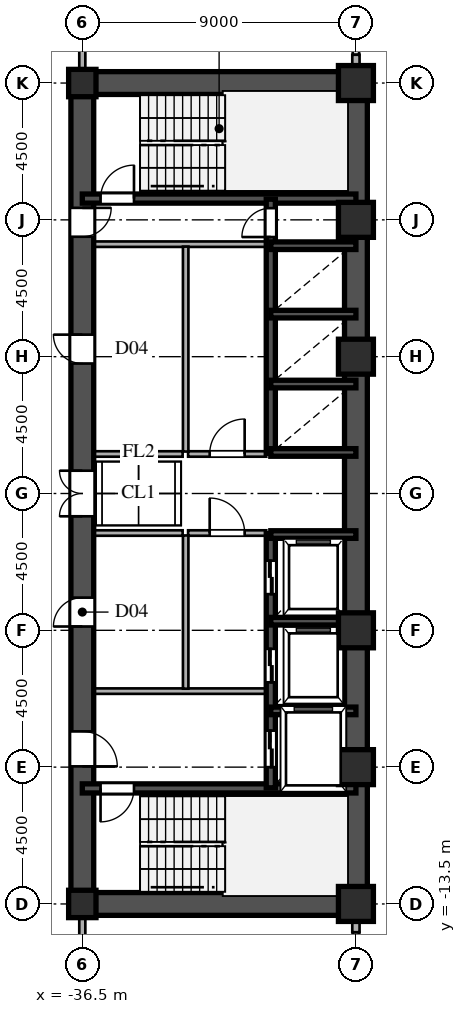
"""IFC4 building model, lengths in metres.
Left out: names, types, materials, properties, quantities, classifications, styles, units other than length and angle.
Written with IfcOpenShell. Run it as: python <this file> out.ifc"""

import sys

from ifc_helpers import new_model, si_unit, direction, frame, frame_2d, origin, origin_2d, place, context, subcontext, project, spatial, rectangle, hollow_rectangle, i_section, extrude, source, transform, mapped, element, fill, save


model = new_model("IFC4")
c1 = context("Model", 3, precision=1e-05, world=origin(), true_north=direction((0.0, 1.0)))
c2 = subcontext(c1, "Body", "Model", "MODEL_VIEW")
j1 = project(units=[si_unit("LENGTHUNIT", "METRE"), si_unit("PLANEANGLEUNIT", "RADIAN")], contexts=[c1])
p1 = place(None, origin())
s1 = spatial("IfcSite", under=j1, at=p1, CompositionType="ELEMENT")
p2 = place(p1, origin())
s2 = spatial("IfcBuilding", under=s1, at=p2, CompositionType="ELEMENT")
p3 = place(p2, frame((0.0, 0.0, 44.1)))
s3 = spatial("IfcBuildingStorey", under=s2, at=p3, CompositionType="ELEMENT", Elevation=44.1)
m1 = source(origin(), c2, "Body", "SweptSolid", [
    extrude(hollow_rectangle(XDim=1.15, YDim=1.15, WallThickness=0.048, at=origin_2d()), origin(), (0.0, 0.0, 1.0), 3.6),
])
for number, where, z_axis, x_axis in (
    (1, (-27.5, -13.5, 0.0), (0.0, 0.0, 1.0), (1.0, 0.0, 0.0)),
    (2, (-27.5, -9.0, 0.0), (0.0, 0.0, 1.0), (1.0, 0.0, 0.0)),
    (3, (-27.5, -4.5, 0.0), (0.0, 0.0, 1.0), (1.0, 0.0, 0.0)),
    (4, (-27.5, 4.5, 0.0), (0.0, 0.0, 1.0), (1.0, 0.0, 0.0)),
    (5, (-27.5, 9.0, 0.0), (0.0, 0.0, 1.0), (1.0, 0.0, 0.0)),
    (6, (-27.5, 13.5, 0.0), (0.0, 0.0, 1.0), (1.0, 0.0, 0.0)),
):
    element("IfcColumn", number, at=place(p3, frame(where, z_axis=z_axis, x_axis=x_axis)), inside=s3, PredefinedType="COLUMN", context=c2, shape_type="MappedRepresentation", body=[
        mapped(m1, transform((0.0, 0.0, 0.0), scale=1.0)),
    ])
m2 = source(origin(), c2, "Body", "SweptSolid", [
    extrude(i_section(OverallWidth=0.9, OverallDepth=0.9, WebThickness=0.036, FlangeThickness=0.055, at=origin_2d()), origin(), (0.0, 0.0, 1.0), 3.6),
])
for number, where, z_axis, x_axis in (
    (7, (-36.5, -13.5, 0.0), (0.0, 0.0, 1.0), (1.0, 0.0, 0.0)),
    (8, (-36.5, 13.5, 0.0), (0.0, 0.0, 1.0), (1.0, 0.0, 0.0)),
):
    element("IfcColumn", number, at=place(p3, frame(where, z_axis=z_axis, x_axis=x_axis)), inside=s3, PredefinedType="COLUMN", context=c2, shape_type="MappedRepresentation", body=[
        mapped(m2, transform((0.0, 0.0, 0.0), scale=1.0)),
    ])
for number, where, z_axis, x_axis in (
    (9, (-27.5, -14.43, 0.0), (0.0, 0.0, 1.0), (0.0, 1.0, 0.0)),
    (10, (-27.5, 13.88, 0.0), (0.0, 0.0, 1.0), (0.0, 1.0, 0.0)),
):
    element("IfcWall", number, at=place(p3, frame(where, z_axis=z_axis, x_axis=x_axis)), inside=s3, PredefinedType="SOLIDWALL", context=c2, shape_type="SweptSolid", body=[
        extrude(rectangle(XDim=0.55, YDim=0.24, at=frame_2d((0.275, 0.0))), origin(), (0.0, 0.0, 1.0), 2.88),
    ])
for number, where, z_axis, x_axis in (
    (11, (-27.5, -13.5, 0.0), (0.0, 0.0, 1.0), (0.0, 1.0, 0.0)),
    (12, (-27.5, 1.3, 0.0), (0.0, 0.0, 1.0), (0.0, 1.0, 0.0)),
):
    element("IfcWall", number, at=place(p3, frame(where, z_axis=z_axis, x_axis=x_axis)), inside=s3, PredefinedType="SHEAR", context=c2, shape_type="SweptSolid", body=[
        extrude(rectangle(XDim=12.2, YDim=0.75, at=frame_2d((6.1, 0.0))), origin(), (0.0, 0.0, 1.0), 3.38),
    ])
p4 = place(p3, frame((-27.5, -1.3, 0.0), z_axis=(0.0, 0.0, 1.0), x_axis=(0.0, 1.0, 0.0)))
e13 = element("IfcWall", 13, at=p4, inside=s3, PredefinedType="SHEAR", context=c2, shape_type="SweptSolid", body=[
    extrude(rectangle(XDim=2.6, YDim=0.75, at=frame_2d((1.3, 0.0))), origin(), (0.0, 0.0, 1.0), 3.38),
])
for number, where, z_axis, x_axis in (
    (14, (-36.5, -13.5, 0.0), (0.0, 0.0, 1.0), (1.0, 0.0, 0.0)),
    (15, (-36.5, 13.5, 0.0), (0.0, 0.0, 1.0), (1.0, 0.0, 0.0)),
):
    element("IfcWall", number, at=place(p3, frame(where, z_axis=z_axis, x_axis=x_axis)), inside=s3, PredefinedType="SHEAR", context=c2, shape_type="SweptSolid", body=[
        extrude(rectangle(XDim=9.0, YDim=0.75, at=frame_2d((4.5, 0.0))), origin(), (0.0, 0.0, 1.0), 3.38),
    ])
p5 = place(p3, frame((-36.5, -13.65, 0.0), z_axis=(0.0, 0.0, 1.0), x_axis=(0.0, 1.0, 0.0)))
e16 = element("IfcWall", 16, at=p5, inside=s3, PredefinedType="SHEAR", context=c2, shape_type="SweptSolid", body=[
    extrude(rectangle(XDim=7.15, YDim=0.75, at=frame_2d((3.575, 0.0))), origin(), (0.0, 0.0, 1.0), 3.38),
])
p6 = place(p5, frame((4.675, 0.0, 0.0)))
e17 = element("IfcOpeningElement", 17, at=p6, cuts=e16, PredefinedType="OPENING", context=c2, shape_type="SweptSolid", body=[
    extrude(rectangle(XDim=1.15, YDim=2.2, at=frame_2d((0.575, 1.1))), frame((0.0, 0.385, 0.0), z_axis=(0.0, -1.0, 0.0), x_axis=(1.0, 0.0, 0.0)), (0.0, 0.0, 1.0), 0.77),
])
p7 = place(p3, frame((-36.5, -1.3, 0.0), z_axis=(0.0, 0.0, 1.0), x_axis=(0.0, 1.0, 0.0)))
e18 = element("IfcWall", 18, at=p7, inside=s3, PredefinedType="SHEAR", context=c2, shape_type="SweptSolid", body=[
    extrude(rectangle(XDim=2.6, YDim=0.75, at=frame_2d((1.3, 0.0))), origin(), (0.0, 0.0, 1.0), 3.38),
])
p8 = place(p7, frame((0.55, 0.0, 0.0)))
e19 = element("IfcOpeningElement", 19, at=p8, cuts=e18, PredefinedType="OPENING", context=c2, shape_type="SweptSolid", body=[
    extrude(rectangle(XDim=1.5, YDim=2.3, at=frame_2d((0.75, 1.15))), frame((0.0, 0.385, 0.0), z_axis=(0.0, -1.0, 0.0), x_axis=(1.0, 0.0, 0.0)), (0.0, 0.0, 1.0), 0.77),
])
p9 = place(p3, frame((-36.5, 8.2, 0.0), z_axis=(0.0, 0.0, 1.0), x_axis=(0.0, 1.0, 0.0)))
e20 = element("IfcWall", 20, at=p9, inside=s3, PredefinedType="SHEAR", context=c2, shape_type="SweptSolid", body=[
    extrude(rectangle(XDim=5.45, YDim=0.75, at=frame_2d((2.725, 0.0))), origin(), (0.0, 0.0, 1.0), 3.38),
])
p10 = place(p9, frame((0.245, 0.0, 0.0)))
e21 = element("IfcOpeningElement", 21, at=p10, cuts=e20, PredefinedType="OPENING", context=c2, shape_type="SweptSolid", body=[
    extrude(rectangle(XDim=0.95, YDim=2.15, at=frame_2d((0.475, 1.075))), frame((0.0, 0.385, 0.0), z_axis=(0.0, -1.0, 0.0), x_axis=(1.0, 0.0, 0.0)), (0.0, 0.0, 1.0), 0.77),
])
p11 = place(p3, frame((-36.5, -6.5, 0.0), z_axis=(0.0, 0.0, 1.0), x_axis=(0.0, 1.0, 0.0)))
e22 = element("IfcWall", 22, at=p11, inside=s3, PredefinedType="SHEAR", context=c2, shape_type="SweptSolid", body=[
    extrude(rectangle(XDim=5.2, YDim=0.75, at=frame_2d((2.6, 0.0))), origin(), (0.0, 0.0, 1.0), 3.38),
])
p12 = place(p11, frame((2.125, 0.0, 0.0)))
e23 = element("IfcOpeningElement", 23, at=p12, cuts=e22, PredefinedType="OPENING", context=c2, shape_type="SweptSolid", body=[
    extrude(rectangle(XDim=0.95, YDim=2.15, at=frame_2d((0.475, 1.075))), frame((0.0, 0.385, 0.0), z_axis=(0.0, -1.0, 0.0), x_axis=(1.0, 0.0, 0.0)), (0.0, 0.0, 1.0), 0.77),
])
p13 = place(p3, frame((-36.5, 1.3, 0.0), z_axis=(0.0, 0.0, 1.0), x_axis=(0.0, 1.0, 0.0)))
e24 = element("IfcWall", 24, at=p13, inside=s3, PredefinedType="SHEAR", context=c2, shape_type="SweptSolid", body=[
    extrude(rectangle(XDim=6.9, YDim=0.75, at=frame_2d((3.45, 0.0))), origin(), (0.0, 0.0, 1.0), 3.38),
])
p14 = place(p13, frame((2.975, 0.0, 0.0)))
e25 = element("IfcOpeningElement", 25, at=p14, cuts=e24, PredefinedType="OPENING", context=c2, shape_type="SweptSolid", body=[
    extrude(rectangle(XDim=0.95, YDim=2.15, at=frame_2d((0.475, 1.075))), frame((0.0, 0.385, 0.0), z_axis=(0.0, -1.0, 0.0), x_axis=(1.0, 0.0, 0.0)), (0.0, 0.0, 1.0), 0.77),
])
p15 = place(p3, frame((-36.5, -9.7, 0.0), z_axis=(0.0, 0.0, 1.0), x_axis=(1.0, 0.0, 0.0)))
e26 = element("IfcWall", 26, at=p15, inside=s3, PredefinedType="SHEAR", context=c2, shape_type="SweptSolid", body=[
    extrude(rectangle(XDim=9.0, YDim=0.3, at=frame_2d((4.5, 0.0))), origin(), (0.0, 0.0, 1.0), 3.38),
])
p16 = place(p15, frame((0.6, 0.0, 0.0)))
e27 = element("IfcOpeningElement", 27, at=p16, cuts=e26, PredefinedType="OPENING", context=c2, shape_type="SweptSolid", body=[
    extrude(rectangle(XDim=1.1, YDim=2.2, at=frame_2d((0.55, 1.1))), frame((0.0, 0.16, 0.0), z_axis=(0.0, -1.0, 0.0), x_axis=(1.0, 0.0, 0.0)), (0.0, 0.0, 1.0), 0.32),
])
p17 = place(p3, frame((-36.5, 9.7, 0.0), z_axis=(0.0, 0.0, 1.0), x_axis=(1.0, 0.0, 0.0)))
e28 = element("IfcWall", 28, at=p17, inside=s3, PredefinedType="SHEAR", context=c2, shape_type="SweptSolid", body=[
    extrude(rectangle(XDim=9.0, YDim=0.3, at=frame_2d((4.5, 0.0))), origin(), (0.0, 0.0, 1.0), 3.38),
])
p18 = place(p17, frame((0.6, 0.0, 0.0)))
e29 = element("IfcOpeningElement", 29, at=p18, cuts=e28, PredefinedType="OPENING", context=c2, shape_type="SweptSolid", body=[
    extrude(rectangle(XDim=1.1, YDim=2.2, at=frame_2d((0.55, 1.1))), frame((0.0, 0.16, 0.0), z_axis=(0.0, -1.0, 0.0), x_axis=(1.0, 0.0, 0.0)), (0.0, 0.0, 1.0), 0.32),
])
for number, where, z_axis, x_axis in (
    (30, (-30.3, -7.15, 0.0), (0.0, 0.0, 1.0), (1.0, 0.0, 0.0)),
    (31, (-30.3, -4.2, 0.0), (0.0, 0.0, 1.0), (1.0, 0.0, 0.0)),
    (32, (-30.3, -1.35, 0.0), (0.0, 0.0, 1.0), (1.0, 0.0, 0.0)),
    (33, (-30.3, 1.35, 0.0), (0.0, 0.0, 1.0), (1.0, 0.0, 0.0)),
    (34, (-30.3, 3.6, 0.0), (0.0, 0.0, 1.0), (1.0, 0.0, 0.0)),
    (35, (-30.3, 5.9, 0.0), (0.0, 0.0, 1.0), (1.0, 0.0, 0.0)),
    (36, (-30.3, 8.15, 0.0), (0.0, 0.0, 1.0), (1.0, 0.0, 0.0)),
):
    element("IfcWall", number, at=place(p3, frame(where, z_axis=z_axis, x_axis=x_axis)), inside=s3, PredefinedType="SHEAR", context=c2, shape_type="SweptSolid", body=[
        extrude(rectangle(XDim=2.8, YDim=0.25, at=frame_2d((1.4, 0.0))), origin(), (0.0, 0.0, 1.0), 3.38),
    ])
p19 = place(p3, frame((-30.3, -9.68, 0.0), z_axis=(0.0, 0.0, 1.0), x_axis=(0.0, 1.0, 0.0)))
e37 = element("IfcWall", 37, at=p19, inside=s3, PredefinedType="SHEAR", context=c2, shape_type="SweptSolid", body=[
    extrude(rectangle(XDim=2.56, YDim=0.3, at=frame_2d((1.28, 0.0))), origin(), (0.0, 0.0, 1.0), 3.38),
])
p20 = place(p19, frame((0.68, 0.0, 0.0)))
e38 = element("IfcOpeningElement", 38, at=p20, cuts=e37, PredefinedType="OPENING", context=c2, shape_type="SweptSolid", body=[
    extrude(rectangle(XDim=1.2, YDim=2.25, at=frame_2d((0.6, 1.125))), frame((0.0, 0.16, 0.0), z_axis=(0.0, -1.0, 0.0), x_axis=(1.0, 0.0, 0.0)), (0.0, 0.0, 1.0), 0.32),
])
p21 = place(p3, frame((-30.3, -7.12, 0.0), z_axis=(0.0, 0.0, 1.0), x_axis=(0.0, 1.0, 0.0)))
e39 = element("IfcWall", 39, at=p21, inside=s3, PredefinedType="SHEAR", context=c2, shape_type="SweptSolid", body=[
    extrude(rectangle(XDim=2.92, YDim=0.3, at=frame_2d((1.46, 0.0))), origin(), (0.0, 0.0, 1.0), 3.38),
])
p22 = place(p21, frame((0.91, 0.0, 0.0)))
e40 = element("IfcOpeningElement", 40, at=p22, cuts=e39, PredefinedType="OPENING", context=c2, shape_type="SweptSolid", body=[
    extrude(rectangle(XDim=1.1, YDim=2.2, at=frame_2d((0.55, 1.1))), frame((0.0, 0.16, 0.0), z_axis=(0.0, -1.0, 0.0), x_axis=(1.0, 0.0, 0.0)), (0.0, 0.0, 1.0), 0.32),
])
p23 = place(p3, frame((-30.3, -4.2, 0.0), z_axis=(0.0, 0.0, 1.0), x_axis=(0.0, 1.0, 0.0)))
e41 = element("IfcWall", 41, at=p23, inside=s3, PredefinedType="SHEAR", context=c2, shape_type="SweptSolid", body=[
    extrude(rectangle(XDim=2.88, YDim=0.3, at=frame_2d((1.44, 0.0))), origin(), (0.0, 0.0, 1.0), 3.38),
])
p24 = place(p23, frame((0.89, 0.0, 0.0)))
e42 = element("IfcOpeningElement", 42, at=p24, cuts=e41, PredefinedType="OPENING", context=c2, shape_type="SweptSolid", body=[
    extrude(rectangle(XDim=1.1, YDim=2.2, at=frame_2d((0.55, 1.1))), frame((0.0, 0.16, 0.0), z_axis=(0.0, -1.0, 0.0), x_axis=(1.0, 0.0, 0.0)), (0.0, 0.0, 1.0), 0.32),
])
p25 = place(p3, frame((-30.3, 1.32, 0.0), z_axis=(0.0, 0.0, 1.0), x_axis=(0.0, 1.0, 0.0)))
e43 = element("IfcWall", 43, at=p25, inside=s3, PredefinedType="SHEAR", context=c2, shape_type="SweptSolid", body=[
    extrude(rectangle(XDim=2.28, YDim=0.3, at=frame_2d((1.14, 0.0))), origin(), (0.0, 0.0, 1.0), 3.38),
])
p26 = place(p3, frame((-30.3, 3.6, 0.0), z_axis=(0.0, 0.0, 1.0), x_axis=(0.0, 1.0, 0.0)))
e44 = element("IfcWall", 44, at=p26, inside=s3, PredefinedType="SHEAR", context=c2, shape_type="SweptSolid", body=[
    extrude(rectangle(XDim=2.3, YDim=0.3, at=frame_2d((1.15, 0.0))), origin(), (0.0, 0.0, 1.0), 3.38),
])
p27 = place(p3, frame((-30.3, 5.9, 0.0), z_axis=(0.0, 0.0, 1.0), x_axis=(0.0, 1.0, 0.0)))
e45 = element("IfcWall", 45, at=p27, inside=s3, PredefinedType="SHEAR", context=c2, shape_type="SweptSolid", body=[
    extrude(rectangle(XDim=2.25, YDim=0.3, at=frame_2d((1.125, 0.0))), origin(), (0.0, 0.0, 1.0), 3.38),
])
p28 = place(p3, frame((-30.3, 8.15, 0.0), z_axis=(0.0, 0.0, 1.0), x_axis=(0.0, 1.0, 0.0)))
e46 = element("IfcWall", 46, at=p28, inside=s3, PredefinedType="SHEAR", context=c2, shape_type="SweptSolid", body=[
    extrude(rectangle(XDim=1.53, YDim=0.3, at=frame_2d((0.765, 0.0))), origin(), (0.0, 0.0, 1.0), 3.38),
])
p29 = place(p28, frame((0.285, 0.0, 0.0)))
e47 = element("IfcOpeningElement", 47, at=p29, cuts=e46, PredefinedType="OPENING", context=c2, shape_type="SweptSolid", body=[
    extrude(rectangle(XDim=0.95, YDim=2.15, at=frame_2d((0.475, 1.075))), frame((0.0, 0.16, 0.0), z_axis=(0.0, -1.0, 0.0), x_axis=(1.0, 0.0, 0.0)), (0.0, 0.0, 1.0), 0.32),
])
for number, where, z_axis, x_axis in (
    (48, (-36.15, -6.5, 0.0), (0.0, 0.0, 1.0), (1.0, 0.0, 0.0)),
    (49, (-36.15, 8.2, 0.0), (0.0, 0.0, 1.0), (1.0, 0.0, 0.0)),
):
    element("IfcWall", number, at=place(p3, frame(where, z_axis=z_axis, x_axis=x_axis)), inside=s3, PredefinedType="PARTITIONING", context=c2, shape_type="SweptSolid", body=[
        extrude(rectangle(XDim=5.7, YDim=0.18, at=frame_2d((2.85, 0.0))), origin(), (0.0, 0.0, 1.0), 3.38),
    ])
p30 = place(p3, frame((-33.1, -6.42, 0.0), z_axis=(0.0, 0.0, 1.0), x_axis=(0.0, 1.0, 0.0)))
e50 = element("IfcWall", 50, at=p30, inside=s3, PredefinedType="PARTITIONING", context=c2, shape_type="SweptSolid", body=[
    extrude(rectangle(XDim=5.04, YDim=0.18, at=frame_2d((2.52, 0.0))), origin(), (0.0, 0.0, 1.0), 3.38),
])
p31 = place(p3, frame((-33.1, 1.38, 0.0), z_axis=(0.0, 0.0, 1.0), x_axis=(0.0, 1.0, 0.0)))
e51 = element("IfcWall", 51, at=p31, inside=s3, PredefinedType="PARTITIONING", context=c2, shape_type="SweptSolid", body=[
    extrude(rectangle(XDim=6.74, YDim=0.18, at=frame_2d((3.37, 0.0))), origin(), (0.0, 0.0, 1.0), 3.38),
])
p32 = place(p3, frame((-33.02, -1.3, 0.0), z_axis=(0.0, 0.0, 1.0), x_axis=(1.0, 0.0, 0.0)))
e52 = element("IfcWall", 52, at=p32, inside=s3, PredefinedType="PARTITIONING", context=c2, shape_type="SweptSolid", body=[
    extrude(rectangle(XDim=2.57, YDim=0.18, at=frame_2d((1.285, 0.0))), origin(), (0.0, 0.0, 1.0), 3.38),
])
p33 = place(p32, frame((0.71, 0.0, 0.0)))
e53 = element("IfcOpeningElement", 53, at=p33, cuts=e52, PredefinedType="OPENING", context=c2, shape_type="SweptSolid", body=[
    extrude(rectangle(XDim=1.15, YDim=2.2, at=frame_2d((0.575, 1.1))), frame((0.0, 0.1, 0.0), z_axis=(0.0, -1.0, 0.0), x_axis=(1.0, 0.0, 0.0)), (0.0, 0.0, 1.0), 0.2),
])
p34 = place(p3, frame((-33.02, 1.3, 0.0), z_axis=(0.0, 0.0, 1.0), x_axis=(1.0, 0.0, 0.0)))
e54 = element("IfcWall", 54, at=p34, inside=s3, PredefinedType="PARTITIONING", context=c2, shape_type="SweptSolid", body=[
    extrude(rectangle(XDim=2.57, YDim=0.18, at=frame_2d((1.285, 0.0))), origin(), (0.0, 0.0, 1.0), 3.38),
])
p35 = place(p34, frame((0.71, 0.0, 0.0)))
e55 = element("IfcOpeningElement", 55, at=p35, cuts=e54, PredefinedType="OPENING", context=c2, shape_type="SweptSolid", body=[
    extrude(rectangle(XDim=1.15, YDim=2.2, at=frame_2d((0.575, 1.1))), frame((0.0, 0.1, 0.0), z_axis=(0.0, -1.0, 0.0), x_axis=(1.0, 0.0, 0.0)), (0.0, 0.0, 1.0), 0.2),
])
for number, where, z_axis, x_axis in (
    (56, (-36.15, -1.3, 0.0), (0.0, 0.0, 1.0), (1.0, 0.0, 0.0)),
    (57, (-36.15, 1.3, 0.0), (0.0, 0.0, 1.0), (1.0, 0.0, 0.0)),
):
    element("IfcWall", number, at=place(p3, frame(where, z_axis=z_axis, x_axis=x_axis)), inside=s3, PredefinedType="PARTITIONING", context=c2, shape_type="SweptSolid", body=[
        extrude(rectangle(XDim=2.95, YDim=0.18, at=frame_2d((1.475, 0.0))), origin(), (0.0, 0.0, 1.0), 3.38),
    ])
for number, where, z_axis, x_axis in (
    (58, (-36.5, -15.515, 0.0), (0.0, 0.0, 1.0), (0.0, 1.0, 0.0)),
    (59, (-36.5, 13.88, 0.0), (0.0, 0.0, 1.0), (0.0, 1.0, 0.0)),
):
    element("IfcWall", number, at=place(p3, frame(where, z_axis=z_axis, x_axis=x_axis)), inside=s3, PredefinedType="PARTITIONING", context=c2, shape_type="SweptSolid", body=[
        extrude(rectangle(XDim=1.635, YDim=0.2, at=frame_2d((0.817, 0.0))), origin(), (0.0, 0.0, 1.0), 2.68),
    ])
m3 = source(origin(), c2, "Body", "SweptSolid", [
    extrude(rectangle(XDim=1.15, YDim=2.2, at=frame_2d((0.575, 1.1))), frame((0.0, 0.025, 0.0), z_axis=(0.0, -1.0, 0.0), x_axis=(1.0, 0.0, 0.0)), (0.0, 0.0, 1.0), 0.05),
])
p36 = place(p6, frame((1.15, 0.0, 0.0), z_axis=(0.0, 0.0, 1.0), x_axis=(-1.0, 0.0, 0.0)))
e60 = element("IfcDoor", 60, at=p36, inside=s3, OperationType="SINGLE_SWING_LEFT", PredefinedType="DOOR", context=c2, shape_type="MappedRepresentation", body=[
    mapped(m3, transform((0.0, 0.0, 0.0), scale=1.0)),
])
fill(e17, e60)
m4 = source(origin(), c2, "Body", "SweptSolid", [
    extrude(rectangle(XDim=1.5, YDim=2.3, at=frame_2d((0.75, 1.15))), frame((0.0, 0.025, 0.0), z_axis=(0.0, -1.0, 0.0), x_axis=(1.0, 0.0, 0.0)), (0.0, 0.0, 1.0), 0.05),
])
p37 = place(p8, origin())
e61 = element("IfcDoor", 61, at=p37, inside=s3, OperationType="DOUBLE_SWING_LEFT", PredefinedType="DOOR", context=c2, shape_type="MappedRepresentation", body=[
    mapped(m4, transform((0.0, 0.0, 0.0), scale=1.0)),
])
fill(e19, e61)
m5 = source(origin(), c2, "Body", "SweptSolid", [
    extrude(rectangle(XDim=0.95, YDim=2.15, at=frame_2d((0.475, 1.075))), frame((0.0, 0.025, 0.0), z_axis=(0.0, -1.0, 0.0), x_axis=(1.0, 0.0, 0.0)), (0.0, 0.0, 1.0), 0.05),
])
p38 = place(p10, frame((0.95, 0.0, 0.0), z_axis=(0.0, 0.0, 1.0), x_axis=(-1.0, 0.0, 0.0)))
e62 = element("IfcDoor", 62, at=p38, inside=s3, OperationType="SINGLE_SWING_RIGHT", PredefinedType="DOOR", context=c2, shape_type="MappedRepresentation", body=[
    mapped(m5, transform((0.0, 0.0, 0.0), scale=1.0)),
])
fill(e21, e62)
p39 = place(p12, origin())
e63 = element("IfcDoor", 63, at=p39, inside=s3, OperationType="SINGLE_SWING_LEFT", PredefinedType="DOOR", context=c2, shape_type="MappedRepresentation", body=[
    mapped(m5, transform((0.0, 0.0, 0.0), scale=1.0)),
])
fill(e23, e63)
p40 = place(p14, origin())
e64 = element("IfcDoor", 64, at=p40, inside=s3, OperationType="SINGLE_SWING_RIGHT", PredefinedType="DOOR", context=c2, shape_type="MappedRepresentation", body=[
    mapped(m5, transform((0.0, 0.0, 0.0), scale=1.0)),
])
fill(e25, e64)
m6 = source(origin(), c2, "Body", "SweptSolid", [
    extrude(rectangle(XDim=1.1, YDim=2.2, at=frame_2d((0.55, 1.1))), frame((0.0, 0.025, 0.0), z_axis=(0.0, -1.0, 0.0), x_axis=(1.0, 0.0, 0.0)), (0.0, 0.0, 1.0), 0.05),
])
p41 = place(p16, frame((1.1, 0.0, 0.0), z_axis=(0.0, 0.0, 1.0), x_axis=(-1.0, 0.0, 0.0)))
e65 = element("IfcDoor", 65, at=p41, inside=s3, OperationType="SINGLE_SWING_LEFT", PredefinedType="DOOR", context=c2, shape_type="MappedRepresentation", body=[
    mapped(m6, transform((0.0, 0.0, 0.0), scale=1.0)),
])
fill(e27, e65)
p42 = place(p18, origin())
e66 = element("IfcDoor", 66, at=p42, inside=s3, OperationType="SINGLE_SWING_RIGHT", PredefinedType="DOOR", context=c2, shape_type="MappedRepresentation", body=[
    mapped(m6, transform((0.0, 0.0, 0.0), scale=1.0)),
])
fill(e29, e66)
m7 = source(origin(), c2, "Body", "SweptSolid", [
    extrude(rectangle(XDim=1.2, YDim=2.25, at=frame_2d((0.6, 1.125))), frame((0.0, 0.025, 0.0), z_axis=(0.0, -1.0, 0.0), x_axis=(1.0, 0.0, 0.0)), (0.0, 0.0, 1.0), 0.05),
])
p43 = place(p20, origin())
e67 = element("IfcDoor", 67, at=p43, inside=s3, OperationType="DOUBLE_DOOR_SLIDING", PredefinedType="DOOR", context=c2, shape_type="MappedRepresentation", body=[
    mapped(m7, transform((0.0, 0.0, 0.0), scale=1.0)),
])
fill(e38, e67)
m8 = source(origin(), c2, "Body", "SweptSolid", [
    extrude(rectangle(XDim=1.1, YDim=2.2, at=frame_2d((0.55, 1.1))), frame((0.0, 0.025, 0.0), z_axis=(0.0, -1.0, 0.0), x_axis=(1.0, 0.0, 0.0)), (0.0, 0.0, 1.0), 0.05),
])
p44 = place(p22, origin())
e68 = element("IfcDoor", 68, at=p44, inside=s3, OperationType="DOUBLE_DOOR_SLIDING", PredefinedType="DOOR", context=c2, shape_type="MappedRepresentation", body=[
    mapped(m8, transform((0.0, 0.0, 0.0), scale=1.0)),
])
fill(e40, e68)
p45 = place(p24, origin())
e69 = element("IfcDoor", 69, at=p45, inside=s3, OperationType="DOUBLE_DOOR_SLIDING", PredefinedType="DOOR", context=c2, shape_type="MappedRepresentation", body=[
    mapped(m8, transform((0.0, 0.0, 0.0), scale=1.0)),
])
fill(e42, e69)
p46 = place(p29, origin())
e70 = element("IfcDoor", 70, at=p46, inside=s3, OperationType="SINGLE_SWING_LEFT", PredefinedType="DOOR", context=c2, shape_type="MappedRepresentation", body=[
    mapped(m5, transform((0.0, 0.0, 0.0), scale=1.0)),
])
fill(e47, e70)
p47 = place(p33, origin())
e71 = element("IfcDoor", 71, at=p47, inside=s3, OperationType="SINGLE_SWING_LEFT", PredefinedType="DOOR", context=c2, shape_type="MappedRepresentation", body=[
    mapped(m3, transform((0.0, 0.0, 0.0), scale=1.0)),
])
fill(e53, e71)
p48 = place(p35, origin())
e72 = element("IfcDoor", 72, at=p48, inside=s3, OperationType="SINGLE_SWING_RIGHT", PredefinedType="DOOR", context=c2, shape_type="MappedRepresentation", body=[
    mapped(m3, transform((0.0, 0.0, 0.0), scale=1.0)),
])
fill(e55, e72)
save(model, sys.argv[1])
